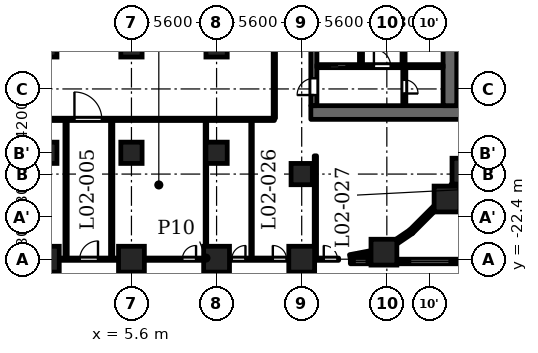
"""IFC4 building model, lengths in metres.
Left out: names, types, materials, properties, quantities, classifications, styles, units other than length and angle.
Written with IfcOpenShell. Run it as: python <this file> out.ifc"""

import sys

from ifc_helpers import new_model, si_unit, direction, frame, frame_2d, origin, origin_2d, place, context, subcontext, project, spatial, polyline, rectangle, outline, extrude, element, fill, save


model = new_model("IFC4")
c1 = context("Model", 3, precision=1e-05, world=origin(), true_north=direction((0.0, 1.0)))
c2 = subcontext(c1, "Body", "Model", "MODEL_VIEW")
j1 = project(units=[si_unit("LENGTHUNIT", "METRE"), si_unit("PLANEANGLEUNIT", "RADIAN")], contexts=[c1])
p1 = place(None, origin())
s1 = spatial("IfcSite", under=j1, at=p1, CompositionType="ELEMENT")
p2 = place(p1, origin())
s2 = spatial("IfcBuilding", under=s1, at=p2, CompositionType="ELEMENT")
p3 = place(p2, frame((0.0, 0.0, 11.3)))
s3 = spatial("IfcBuildingStorey", under=s2, at=p3, CompositionType="ELEMENT", Elevation=11.3)
for number, where, z_axis, x_axis in (
    (1, (0.0, -22.4, 0.0), (0.0, 0.0, 1.0), (1.0, 0.0, 0.0)),
    (2, (5.6, -22.4, 0.0), (0.0, 0.0, 1.0), (1.0, 0.0, 0.0)),
    (3, (11.2, -22.4, 0.0), (0.0, 0.0, 1.0), (1.0, 0.0, 0.0)),
    (4, (16.8, -22.4, 0.0), (0.0, 0.0, 1.0), (1.0, 0.0, 0.0)),
    (5, (22.209, -21.938, 0.0), (0.0, 0.0, 1.0), (1.0, 0.0, 0.0)),
    (6, (26.36, -18.44, 0.0), (0.0, 0.0, 1.0), (1.0, 0.0, 0.0)),
    (7, (27.538, -16.609, 0.0), (0.0, 0.0, 1.0), (1.0, 0.0, 0.0)),
):
    element("IfcColumn", number, at=place(p3, frame(where, z_axis=z_axis, x_axis=x_axis)), inside=s3, PredefinedType="COLUMN", context=c2, shape_type="SweptSolid", body=[
        extrude(rectangle(XDim=1.7, YDim=1.7, at=origin_2d()), origin(), (0.0, 0.0, 1.0), 4.8),
    ])
for number, where, z_axis, x_axis in (
    (8, (0.0, -8.4, 0.0), (0.0, 0.0, 1.0), (1.0, 0.0, 0.0)),
    (9, (5.6, -8.4, 0.0), (0.0, 0.0, 1.0), (1.0, 0.0, 0.0)),
    (10, (11.2, -8.4, 0.0), (0.0, 0.0, 1.0), (1.0, 0.0, 0.0)),
    (11, (16.8, -16.8, 0.0), (0.0, 0.0, 1.0), (1.0, 0.0, 0.0)),
    (12, (0.0, -15.4, 0.0), (0.0, 0.0, 1.0), (1.0, 0.0, 0.0)),
    (13, (5.6, -15.4, 0.0), (0.0, 0.0, 1.0), (1.0, 0.0, 0.0)),
    (14, (11.2, -15.4, 0.0), (0.0, 0.0, 1.0), (1.0, 0.0, 0.0)),
):
    element("IfcColumn", number, at=place(p3, frame(where, z_axis=z_axis, x_axis=x_axis)), inside=s3, PredefinedType="COLUMN", context=c2, shape_type="SweptSolid", body=[
        extrude(rectangle(XDim=1.4, YDim=1.4, at=origin_2d()), origin(), (0.0, 0.0, 1.0), 4.8),
    ])
p4 = place(p3, frame((27.4, -22.55, 0.0), z_axis=(0.0, 0.0, 1.0), x_axis=(-1.0, 0.0, 0.0)))
e15 = element("IfcWall", 15, at=p4, inside=s3, PredefinedType="SOLIDWALL", context=c2, shape_type="SweptSolid", body=[
    extrude(rectangle(XDim=4.341, YDim=0.3, at=frame_2d((2.171, 0.0))), origin(), (0.0, 0.0, 1.0), 4.45),
])
p5 = place(p4, frame((0.871, 0.0, 0.9)))
e16 = element("IfcOpeningElement", 16, at=p5, cuts=e15, PredefinedType="OPENING", context=c2, shape_type="SweptSolid", body=[
    extrude(rectangle(XDim=2.6, YDim=1.25, at=frame_2d((1.3, 0.625))), frame((0.0, 0.16, 0.0), z_axis=(0.0, -1.0, 0.0), x_axis=(1.0, 0.0, 0.0)), (0.0, 0.0, 1.0), 0.32),
])
p6 = place(p3, frame((21.359, -22.55, 0.0), z_axis=(0.0, 0.0, 1.0), x_axis=(-1.0, 0.0, 0.0)))
e17 = element("IfcWall", 17, at=p6, inside=s3, PredefinedType="SOLIDWALL", context=c2, shape_type="SweptSolid", body=[
    extrude(rectangle(XDim=1.359, YDim=0.3, at=frame_2d((0.679, 0.0))), origin(), (0.0, 0.0, 1.0), 3.55),
])
p7 = place(p6, frame((0.279, 0.0, 0.6)))
e18 = element("IfcOpeningElement", 18, at=p7, cuts=e17, PredefinedType="OPENING", context=c2, shape_type="SweptSolid", body=[
    extrude(rectangle(XDim=0.8, YDim=1.55, at=frame_2d((0.4, 0.775))), frame((0.0, 0.16, 0.0), z_axis=(0.0, -1.0, 0.0), x_axis=(1.0, 0.0, 0.0)), (0.0, 0.0, 1.0), 0.32),
])
for number, where, z_axis, x_axis in (
    (19, (19.972, -22.253, 0.0), (0.0, 0.0, 1.0), (0.982, 0.187, 0.0)),
    (20, (22.85, -21.369, 0.0), (0.0, 0.0, 1.0), (0.827, 0.562, 0.0)),
):
    element("IfcWall", number, at=place(p3, frame(where, z_axis=z_axis, x_axis=x_axis)), inside=s3, PredefinedType="SOLIDWALL", context=c2, shape_type="SweptSolid", body=[
        extrude(rectangle(XDim=1.406, YDim=0.3, at=frame_2d((0.703, 0.0))), origin(), (0.0, 0.0, 1.0), 3.55),
    ])
p8 = place(p3, frame((23.991, -20.597, 0.0), z_axis=(0.0, 0.0, 1.0), x_axis=(0.707054835785, 0.707158722772, 0.0)))
e21 = element("IfcWall", 21, at=p8, inside=s3, PredefinedType="SOLIDWALL", context=c2, shape_type="SweptSolid", body=[
    extrude(rectangle(XDim=2.35, YDim=0.3, at=frame_2d((1.175, 0.0))), origin(), (0.0, 0.0, 1.0), 3.55),
])
p9 = place(p3, frame((26.701, -17.644, 0.0), z_axis=(0.0, 0.0, 1.0), x_axis=(0.562001981492, 0.827135885329, 0.0)))
e22 = element("IfcWall", 22, at=p9, inside=s3, PredefinedType="SOLIDWALL", context=c2, shape_type="SweptSolid", body=[
    extrude(rectangle(XDim=0.477, YDim=0.3, at=frame_2d((0.239, 0.0))), origin(), (0.0, 0.0, 1.0), 4.45),
])
p10 = place(p3, frame((20.7, -9.6, 0.0), z_axis=(0.0, 0.0, 1.0), x_axis=(0.0, 1.0, 0.0)))
e23 = element("IfcWall", 23, at=p10, inside=s3, PredefinedType="SHEAR", context=c2, shape_type="SweptSolid", body=[
    extrude(rectangle(XDim=9.75, YDim=0.2, at=frame_2d((4.875, 0.0))), origin(), (0.0, 0.0, 1.0), 4.45),
])
p11 = place(p3, frame((17.4, -12.75, 0.0), z_axis=(0.0, 0.0, 1.0), x_axis=(1.0, 0.0, 0.0)))
e24 = element("IfcWall", 24, at=p11, inside=s3, PredefinedType="SHEAR", context=c2, shape_type="SweptSolid", body=[
    extrude(rectangle(XDim=10.4, YDim=0.9, at=frame_2d((5.2, 0.0))), origin(), (0.0, 0.0, 1.0), 4.45),
])
p12 = place(p3, frame((17.6, -12.3, 0.0), z_axis=(0.0, 0.0, 1.0), x_axis=(0.0, 1.0, 0.0)))
e25 = element("IfcWall", 25, at=p12, inside=s3, PredefinedType="SHEAR", context=c2, shape_type="SweptSolid", body=[
    extrude(rectangle(XDim=24.6, YDim=0.4, at=frame_2d((12.3, 0.0))), origin(), (0.0, 0.0, 1.0), 4.45),
])
p13 = place(p12, frame((6.0, 0.0, 0.0)))
e26 = element("IfcOpeningElement", 26, at=p13, cuts=e25, PredefinedType="OPENING", context=c2, shape_type="SweptSolid", body=[
    extrude(rectangle(XDim=1.1, YDim=2.1, at=frame_2d((0.55, 1.05))), frame((0.0, 0.21, 0.0), z_axis=(0.0, -1.0, 0.0), x_axis=(1.0, 0.0, 0.0)), (0.0, 0.0, 1.0), 0.42),
])
p14 = place(p12, frame((8.4, 0.0, 0.0)))
e27 = element("IfcOpeningElement", 27, at=p14, cuts=e25, PredefinedType="OPENING", context=c2, shape_type="SweptSolid", body=[
    extrude(rectangle(XDim=1.1, YDim=2.1, at=frame_2d((0.55, 1.05))), frame((0.0, 0.21, 0.0), z_axis=(0.0, -1.0, 0.0), x_axis=(1.0, 0.0, 0.0)), (0.0, 0.0, 1.0), 0.42),
])
p15 = place(p12, frame((10.8, 0.0, 0.0)))
e28 = element("IfcOpeningElement", 28, at=p15, cuts=e25, PredefinedType="OPENING", context=c2, shape_type="SweptSolid", body=[
    extrude(rectangle(XDim=1.1, YDim=2.1, at=frame_2d((0.55, 1.05))), frame((0.0, 0.21, 0.0), z_axis=(0.0, -1.0, 0.0), x_axis=(1.0, 0.0, 0.0)), (0.0, 0.0, 1.0), 0.42),
])
p16 = place(p12, frame((16.75, 0.0, 0.0)))
e29 = element("IfcOpeningElement", 29, at=p16, cuts=e25, PredefinedType="OPENING", context=c2, shape_type="SweptSolid", body=[
    extrude(rectangle(XDim=0.9, YDim=2.1, at=frame_2d((0.45, 1.05))), frame((0.0, 0.21, 0.0), z_axis=(0.0, -1.0, 0.0), x_axis=(1.0, 0.0, 0.0)), (0.0, 0.0, 1.0), 0.42),
])
p17 = place(p12, frame((22.8, 0.0, 0.0)))
e30 = element("IfcOpeningElement", 30, at=p17, cuts=e25, PredefinedType="OPENING", context=c2, shape_type="SweptSolid", body=[
    extrude(rectangle(XDim=1.1, YDim=2.1, at=frame_2d((0.55, 1.05))), frame((0.0, 0.21, 0.0), z_axis=(0.0, -1.0, 0.0), x_axis=(1.0, 0.0, 0.0)), (0.0, 0.0, 1.0), 0.42),
])
p18 = place(p12, frame((0.7, 0.0, 0.0)))
e31 = element("IfcOpeningElement", 31, at=p18, cuts=e25, PredefinedType="OPENING", context=c2, shape_type="SweptSolid", body=[
    extrude(rectangle(XDim=1.1, YDim=2.1, at=frame_2d((0.55, 1.05))), frame((0.0, 0.21, 0.0), z_axis=(0.0, -1.0, 0.0), x_axis=(1.0, 0.0, 0.0)), (0.0, 0.0, 1.0), 0.42),
])
p19 = place(p12, frame((12.775, 0.0, 0.0)))
e32 = element("IfcOpeningElement", 32, at=p19, cuts=e25, PredefinedType="OPENING", context=c2, shape_type="SweptSolid", body=[
    extrude(rectangle(XDim=1.8, YDim=2.1, at=frame_2d((0.9, 1.05))), frame((0.0, 0.21, 0.0), z_axis=(0.0, -1.0, 0.0), x_axis=(1.0, 0.0, 0.0)), (0.0, 0.0, 1.0), 0.42),
])
p20 = place(p3, frame((26.55, -12.3, 0.0), z_axis=(0.0, 0.0, 1.0), x_axis=(0.0, 1.0, 0.0)))
e33 = element("IfcWall", 33, at=p20, inside=s3, PredefinedType="SHEAR", context=c2, shape_type="SweptSolid", body=[
    extrude(rectangle(XDim=24.6, YDim=0.9, at=frame_2d((12.3, 0.0))), origin(), (0.0, 0.0, 1.0), 4.45),
])
p21 = place(p3, frame((23.55, -12.3, 0.0), z_axis=(0.0, 0.0, 1.0), x_axis=(0.0, 1.0, 0.0)))
e34 = element("IfcWall", 34, at=p21, inside=s3, PredefinedType="PARTITIONING", context=c2, shape_type="SweptSolid", body=[
    extrude(rectangle(XDim=2.5, YDim=0.2, at=frame_2d((1.25, 0.0))), origin(), (0.0, 0.0, 1.0), 4.45),
])
p22 = place(p21, frame((0.8, 0.0, 0.0)))
e35 = element("IfcOpeningElement", 35, at=p22, cuts=e34, PredefinedType="OPENING", context=c2, shape_type="SweptSolid", body=[
    extrude(rectangle(XDim=0.9, YDim=2.1, at=frame_2d((0.45, 1.05))), frame((0.0, 0.11, 0.0), z_axis=(0.0, -1.0, 0.0), x_axis=(1.0, 0.0, 0.0)), (0.0, 0.0, 1.0), 0.22),
])
p23 = place(p3, frame((17.8, -9.7, 0.0), z_axis=(0.0, 0.0, 1.0), x_axis=(1.0, 0.0, 0.0)))
e36 = element("IfcWall", 36, at=p23, inside=s3, PredefinedType="SHEAR", context=c2, shape_type="SweptSolid", body=[
    extrude(rectangle(XDim=8.3, YDim=0.2, at=frame_2d((4.15, 0.0))), origin(), (0.0, 0.0, 1.0), 4.45),
])
p24 = place(p23, frame((0.85, 0.0, 0.0)))
e37 = element("IfcOpeningElement", 37, at=p24, cuts=e36, PredefinedType="OPENING", context=c2, shape_type="SweptSolid", body=[
    extrude(rectangle(XDim=1.1, YDim=2.1, at=frame_2d((0.55, 1.05))), frame((0.0, 0.11, 0.0), z_axis=(0.0, -1.0, 0.0), x_axis=(1.0, 0.0, 0.0)), (0.0, 0.0, 1.0), 0.22),
])
p25 = place(p23, frame((3.75, 0.0, 0.0)))
e38 = element("IfcOpeningElement", 38, at=p25, cuts=e36, PredefinedType="OPENING", context=c2, shape_type="SweptSolid", body=[
    extrude(rectangle(XDim=1.1, YDim=2.1, at=frame_2d((0.55, 1.05))), frame((0.0, 0.11, 0.0), z_axis=(0.0, -1.0, 0.0), x_axis=(1.0, 0.0, 0.0)), (0.0, 0.0, 1.0), 0.22),
])
p26 = place(p3, frame((23.5, -9.6, 0.0), z_axis=(0.0, 0.0, 1.0), x_axis=(0.0, 1.0, 0.0)))
e39 = element("IfcWall", 39, at=p26, inside=s3, PredefinedType="SHEAR", context=c2, shape_type="SweptSolid", body=[
    extrude(rectangle(XDim=6.9, YDim=0.2, at=frame_2d((3.45, 0.0))), origin(), (0.0, 0.0, 1.0), 4.45),
])
p27 = place(p3, frame((-18.98, -22.4, 0.0), z_axis=(0.0, 0.0, 1.0), x_axis=(1.0, 0.0, 0.0)))
e40 = element("IfcWall", 40, at=p27, inside=s3, PredefinedType="PARTITIONING", context=c2, shape_type="SweptSolid", body=[
    extrude(rectangle(XDim=38.211, YDim=0.15, at=frame_2d((19.105, 0.0))), origin(), (0.0, 0.0, 1.0), 3.55),
])
p28 = place(p27, frame((21.18, 0.0, 0.0)))
e41 = element("IfcOpeningElement", 41, at=p28, cuts=e40, PredefinedType="OPENING", context=c2, shape_type="SweptSolid", body=[
    extrude(rectangle(XDim=1.2, YDim=2.1, at=frame_2d((0.6, 1.05))), frame((0.0, 0.085, 0.0), z_axis=(0.0, -1.0, 0.0), x_axis=(1.0, 0.0, 0.0)), (0.0, 0.0, 1.0), 0.17),
])
p29 = place(p27, frame((0.08, 0.0, 0.0)))
e42 = element("IfcOpeningElement", 42, at=p29, cuts=e40, PredefinedType="OPENING", context=c2, shape_type="SweptSolid", body=[
    extrude(rectangle(XDim=1.0, YDim=2.1, at=frame_2d((0.5, 1.05))), frame((0.0, 0.085, 0.0), z_axis=(0.0, -1.0, 0.0), x_axis=(1.0, 0.0, 0.0)), (0.0, 0.0, 1.0), 0.17),
])
p30 = place(p27, frame((3.63, 0.0, 0.0)))
e43 = element("IfcOpeningElement", 43, at=p30, cuts=e40, PredefinedType="OPENING", context=c2, shape_type="SweptSolid", body=[
    extrude(rectangle(XDim=1.0, YDim=2.1, at=frame_2d((0.5, 1.05))), frame((0.0, 0.085, 0.0), z_axis=(0.0, -1.0, 0.0), x_axis=(1.0, 0.0, 0.0)), (0.0, 0.0, 1.0), 0.17),
])
p31 = place(p27, frame((27.93, 0.0, 0.0)))
e44 = element("IfcOpeningElement", 44, at=p31, cuts=e40, PredefinedType="OPENING", context=c2, shape_type="SweptSolid", body=[
    extrude(rectangle(XDim=0.9, YDim=2.1, at=frame_2d((0.45, 1.05))), frame((0.0, 0.085, 0.0), z_axis=(0.0, -1.0, 0.0), x_axis=(1.0, 0.0, 0.0)), (0.0, 0.0, 1.0), 0.17),
])
p32 = place(p27, frame((31.18, 0.0, 0.0)))
e45 = element("IfcOpeningElement", 45, at=p32, cuts=e40, PredefinedType="OPENING", context=c2, shape_type="SweptSolid", body=[
    extrude(rectangle(XDim=0.9, YDim=2.1, at=frame_2d((0.45, 1.05))), frame((0.0, 0.085, 0.0), z_axis=(0.0, -1.0, 0.0), x_axis=(1.0, 0.0, 0.0)), (0.0, 0.0, 1.0), 0.17),
])
p33 = place(p27, frame((33.88, 0.0, 0.0)))
e46 = element("IfcOpeningElement", 46, at=p33, cuts=e40, PredefinedType="OPENING", context=c2, shape_type="SweptSolid", body=[
    extrude(rectangle(XDim=0.9, YDim=2.1, at=frame_2d((0.45, 1.05))), frame((0.0, 0.085, 0.0), z_axis=(0.0, -1.0, 0.0), x_axis=(1.0, 0.0, 0.0)), (0.0, 0.0, 1.0), 0.17),
])
p34 = place(p27, frame((37.231, 0.0, 0.0)))
e47 = element("IfcOpeningElement", 47, at=p34, cuts=e40, PredefinedType="OPENING", context=c2, shape_type="SweptSolid", body=[
    extrude(rectangle(XDim=0.9, YDim=2.1, at=frame_2d((0.45, 1.05))), frame((0.0, 0.085, 0.0), z_axis=(0.0, -1.0, 0.0), x_axis=(1.0, 0.0, 0.0)), (0.0, 0.0, 1.0), 0.17),
])
p35 = place(p3, frame((-15.005, -13.2, 0.0), z_axis=(0.0, 0.0, 1.0), x_axis=(1.0, 0.0, 0.0)))
e48 = element("IfcWall", 48, at=p35, inside=s3, PredefinedType="PARTITIONING", context=c2, shape_type="SweptSolid", body=[
    extrude(rectangle(XDim=30.01, YDim=0.15, at=frame_2d((15.005, 0.0))), origin(), (0.0, 0.0, 1.0), 4.45),
])
p36 = place(p35, frame((16.855, 0.0, 0.0)))
e49 = element("IfcOpeningElement", 49, at=p36, cuts=e48, PredefinedType="OPENING", context=c2, shape_type="SweptSolid", body=[
    extrude(rectangle(XDim=1.8, YDim=2.1, at=frame_2d((0.9, 1.05))), frame((0.0, 0.085, 0.0), z_axis=(0.0, -1.0, 0.0), x_axis=(1.0, 0.0, 0.0)), (0.0, 0.0, 1.0), 0.17),
])
for number, where, z_axis, x_axis in (
    (50, (1.3, -22.325, 0.0), (0.0, 0.0, 1.0), (0.0, 1.0, 0.0)),
    (51, (4.3, -22.325, 0.0), (0.0, 0.0, 1.0), (0.0, 1.0, 0.0)),
):
    element("IfcWall", number, at=place(p3, frame(where, z_axis=z_axis, x_axis=x_axis)), inside=s3, PredefinedType="PARTITIONING", context=c2, shape_type="SweptSolid", body=[
        extrude(rectangle(XDim=9.05, YDim=0.15, at=frame_2d((4.525, 0.0))), origin(), (0.0, 0.0, 1.0), 4.45),
    ])
for number, where, z_axis, x_axis in (
    (52, (10.5, -22.325, 0.0), (0.0, 0.0, 1.0), (0.0, 1.0, 0.0)),
    (53, (13.5, -22.325, 0.0), (0.0, 0.0, 1.0), (0.0, 1.0, 0.0)),
):
    element("IfcWall", number, at=place(p3, frame(where, z_axis=z_axis, x_axis=x_axis)), inside=s3, PredefinedType="PARTITIONING", context=c2, shape_type="SweptSolid", body=[
        extrude(rectangle(XDim=9.05, YDim=0.1, at=frame_2d((4.525, 0.0))), origin(), (0.0, 0.0, 1.0), 4.45),
    ])
p37 = place(p3, frame((15.0, -13.125, 0.0), z_axis=(0.0, 0.0, 1.0), x_axis=(0.0, 1.0, 0.0)))
e54 = element("IfcWall", 54, at=p37, inside=s3, PredefinedType="PARTITIONING", context=c2, shape_type="SweptSolid", body=[
    extrude(rectangle(XDim=6.356, YDim=0.15, at=frame_2d((3.178, 0.0))), origin(), (0.0, 0.0, 1.0), 4.45),
])
p38 = place(p3, frame((17.7, -22.325, 0.0), z_axis=(0.0, 0.0, 1.0), x_axis=(0.0, 1.0, 0.0)))
e55 = element("IfcWall", 55, at=p38, inside=s3, PredefinedType="PARTITIONING", context=c2, shape_type="SweptSolid", body=[
    extrude(rectangle(XDim=6.725, YDim=0.15, at=frame_2d((3.362, 0.0))), origin(), (0.0, 0.0, 1.0), 4.45),
])
p39 = place(p3, origin())
e56 = element("IfcWall", 56, at=p39, inside=s3, PredefinedType="SOLIDWALL", context=c2, shape_type="SweptSolid", body=[
    extrude(outline(polyline([(19.944, -22.105), (19.251, -22.238), (19.251, -22.7), (20.0, -22.7), (20.0, -22.4), (19.944, -22.105)])), origin(), (0.0, 0.0, 1.0), 3.55),
])
p40 = place(p24, origin())
e57 = element("IfcDoor", 57, at=p40, inside=s3, OperationType="DOUBLE_DOOR_SLIDING", PredefinedType="DOOR", context=c2, shape_type="SweptSolid", body=[
    extrude(rectangle(XDim=1.1, YDim=2.1, at=frame_2d((0.55, 1.05))), frame((0.0, 0.025, 0.0), z_axis=(0.0, -1.0, 0.0), x_axis=(1.0, 0.0, 0.0)), (0.0, 0.0, 1.0), 0.05),
])
fill(e37, e57)
p41 = place(p18, origin())
e58 = element("IfcDoor", 58, at=p41, inside=s3, OperationType="SINGLE_SWING_RIGHT", PredefinedType="DOOR", context=c2, shape_type="SweptSolid", body=[
    extrude(rectangle(XDim=1.1, YDim=2.1, at=frame_2d((0.55, 1.05))), frame((0.0, 0.025, 0.0), z_axis=(0.0, -1.0, 0.0), x_axis=(1.0, 0.0, 0.0)), (0.0, 0.0, 1.0), 0.05),
])
fill(e31, e58)
p42 = place(p22, origin())
e59 = element("IfcDoor", 59, at=p42, inside=s3, OperationType="SINGLE_SWING_LEFT", PredefinedType="DOOR", context=c2, shape_type="SweptSolid", body=[
    extrude(rectangle(XDim=0.9, YDim=2.1, at=frame_2d((0.45, 1.05))), frame((0.0, 0.025, 0.0), z_axis=(0.0, -1.0, 0.0), x_axis=(1.0, 0.0, 0.0)), (0.0, 0.0, 1.0), 0.05),
])
fill(e35, e59)
p43 = place(p25, origin())
e60 = element("IfcDoor", 60, at=p43, inside=s3, OperationType="SINGLE_SWING_RIGHT", PredefinedType="DOOR", context=c2, shape_type="SweptSolid", body=[
    extrude(rectangle(XDim=1.1, YDim=2.1, at=frame_2d((0.55, 1.05))), frame((0.0, 0.025, 0.0), z_axis=(0.0, -1.0, 0.0), x_axis=(1.0, 0.0, 0.0)), (0.0, 0.0, 1.0), 0.05),
])
fill(e38, e60)
p44 = place(p36, origin())
e61 = element("IfcDoor", 61, at=p44, inside=s3, OperationType="SINGLE_SWING_RIGHT", PredefinedType="DOOR", context=c2, shape_type="SweptSolid", body=[
    extrude(rectangle(XDim=1.8, YDim=2.1, at=frame_2d((0.9, 1.05))), frame((0.0, 0.025, 0.0), z_axis=(0.0, -1.0, 0.0), x_axis=(1.0, 0.0, 0.0)), (0.0, 0.0, 1.0), 0.05),
])
fill(e49, e61)
p45 = place(p28, origin())
e62 = element("IfcDoor", 62, at=p45, inside=s3, OperationType="SINGLE_SWING_LEFT", PredefinedType="DOOR", context=c2, shape_type="SweptSolid", body=[
    extrude(rectangle(XDim=1.2, YDim=2.1, at=frame_2d((0.6, 1.05))), frame((0.0, 0.025, 0.0), z_axis=(0.0, -1.0, 0.0), x_axis=(1.0, 0.0, 0.0)), (0.0, 0.0, 1.0), 0.05),
])
fill(e41, e62)
p46 = place(p31, origin())
e63 = element("IfcDoor", 63, at=p46, inside=s3, OperationType="SINGLE_SWING_LEFT", PredefinedType="DOOR", context=c2, shape_type="SweptSolid", body=[
    extrude(rectangle(XDim=0.9, YDim=2.1, at=frame_2d((0.45, 1.05))), frame((0.0, 0.025, 0.0), z_axis=(0.0, -1.0, 0.0), x_axis=(1.0, 0.0, 0.0)), (0.0, 0.0, 1.0), 0.05),
])
fill(e44, e63)
p47 = place(p32, origin())
e64 = element("IfcDoor", 64, at=p47, inside=s3, OperationType="SINGLE_SWING_LEFT", PredefinedType="DOOR", context=c2, shape_type="SweptSolid", body=[
    extrude(rectangle(XDim=0.9, YDim=2.1, at=frame_2d((0.45, 1.05))), frame((0.0, 0.025, 0.0), z_axis=(0.0, -1.0, 0.0), x_axis=(1.0, 0.0, 0.0)), (0.0, 0.0, 1.0), 0.05),
])
fill(e45, e64)
p48 = place(p33, origin())
e65 = element("IfcDoor", 65, at=p48, inside=s3, OperationType="SINGLE_SWING_RIGHT", PredefinedType="DOOR", context=c2, shape_type="SweptSolid", body=[
    extrude(rectangle(XDim=0.9, YDim=2.1, at=frame_2d((0.45, 1.05))), frame((0.0, 0.025, 0.0), z_axis=(0.0, -1.0, 0.0), x_axis=(1.0, 0.0, 0.0)), (0.0, 0.0, 1.0), 0.05),
])
fill(e46, e65)
p49 = place(p34, origin())
e66 = element("IfcDoor", 66, at=p49, inside=s3, OperationType="SINGLE_SWING_RIGHT", PredefinedType="DOOR", context=c2, shape_type="SweptSolid", body=[
    extrude(rectangle(XDim=0.9, YDim=2.1, at=frame_2d((0.45, 1.05))), frame((0.0, 0.025, 0.0), z_axis=(0.0, -1.0, 0.0), x_axis=(1.0, 0.0, 0.0)), (0.0, 0.0, 1.0), 0.05),
])
fill(e47, e66)
p50 = place(p5, origin())
e67 = element("IfcWindow", 67, at=p50, inside=s3, PartitioningType="SINGLE_PANEL", PredefinedType="WINDOW", context=c2, shape_type="SweptSolid", body=[
    extrude(rectangle(XDim=2.6, YDim=1.25, at=frame_2d((1.3, 0.625))), frame((0.0, 0.03, 0.0), z_axis=(0.0, -1.0, 0.0), x_axis=(1.0, 0.0, 0.0)), (0.0, 0.0, 1.0), 0.06),
])
fill(e16, e67)
p51 = place(p7, origin())
e68 = element("IfcWindow", 68, at=p51, inside=s3, PartitioningType="SINGLE_PANEL", PredefinedType="WINDOW", context=c2, shape_type="SweptSolid", body=[
    extrude(rectangle(XDim=0.8, YDim=1.55, at=frame_2d((0.4, 0.775))), frame((0.0, 0.03, 0.0), z_axis=(0.0, -1.0, 0.0), x_axis=(1.0, 0.0, 0.0)), (0.0, 0.0, 1.0), 0.06),
])
fill(e18, e68)
save(model, sys.argv[1])
